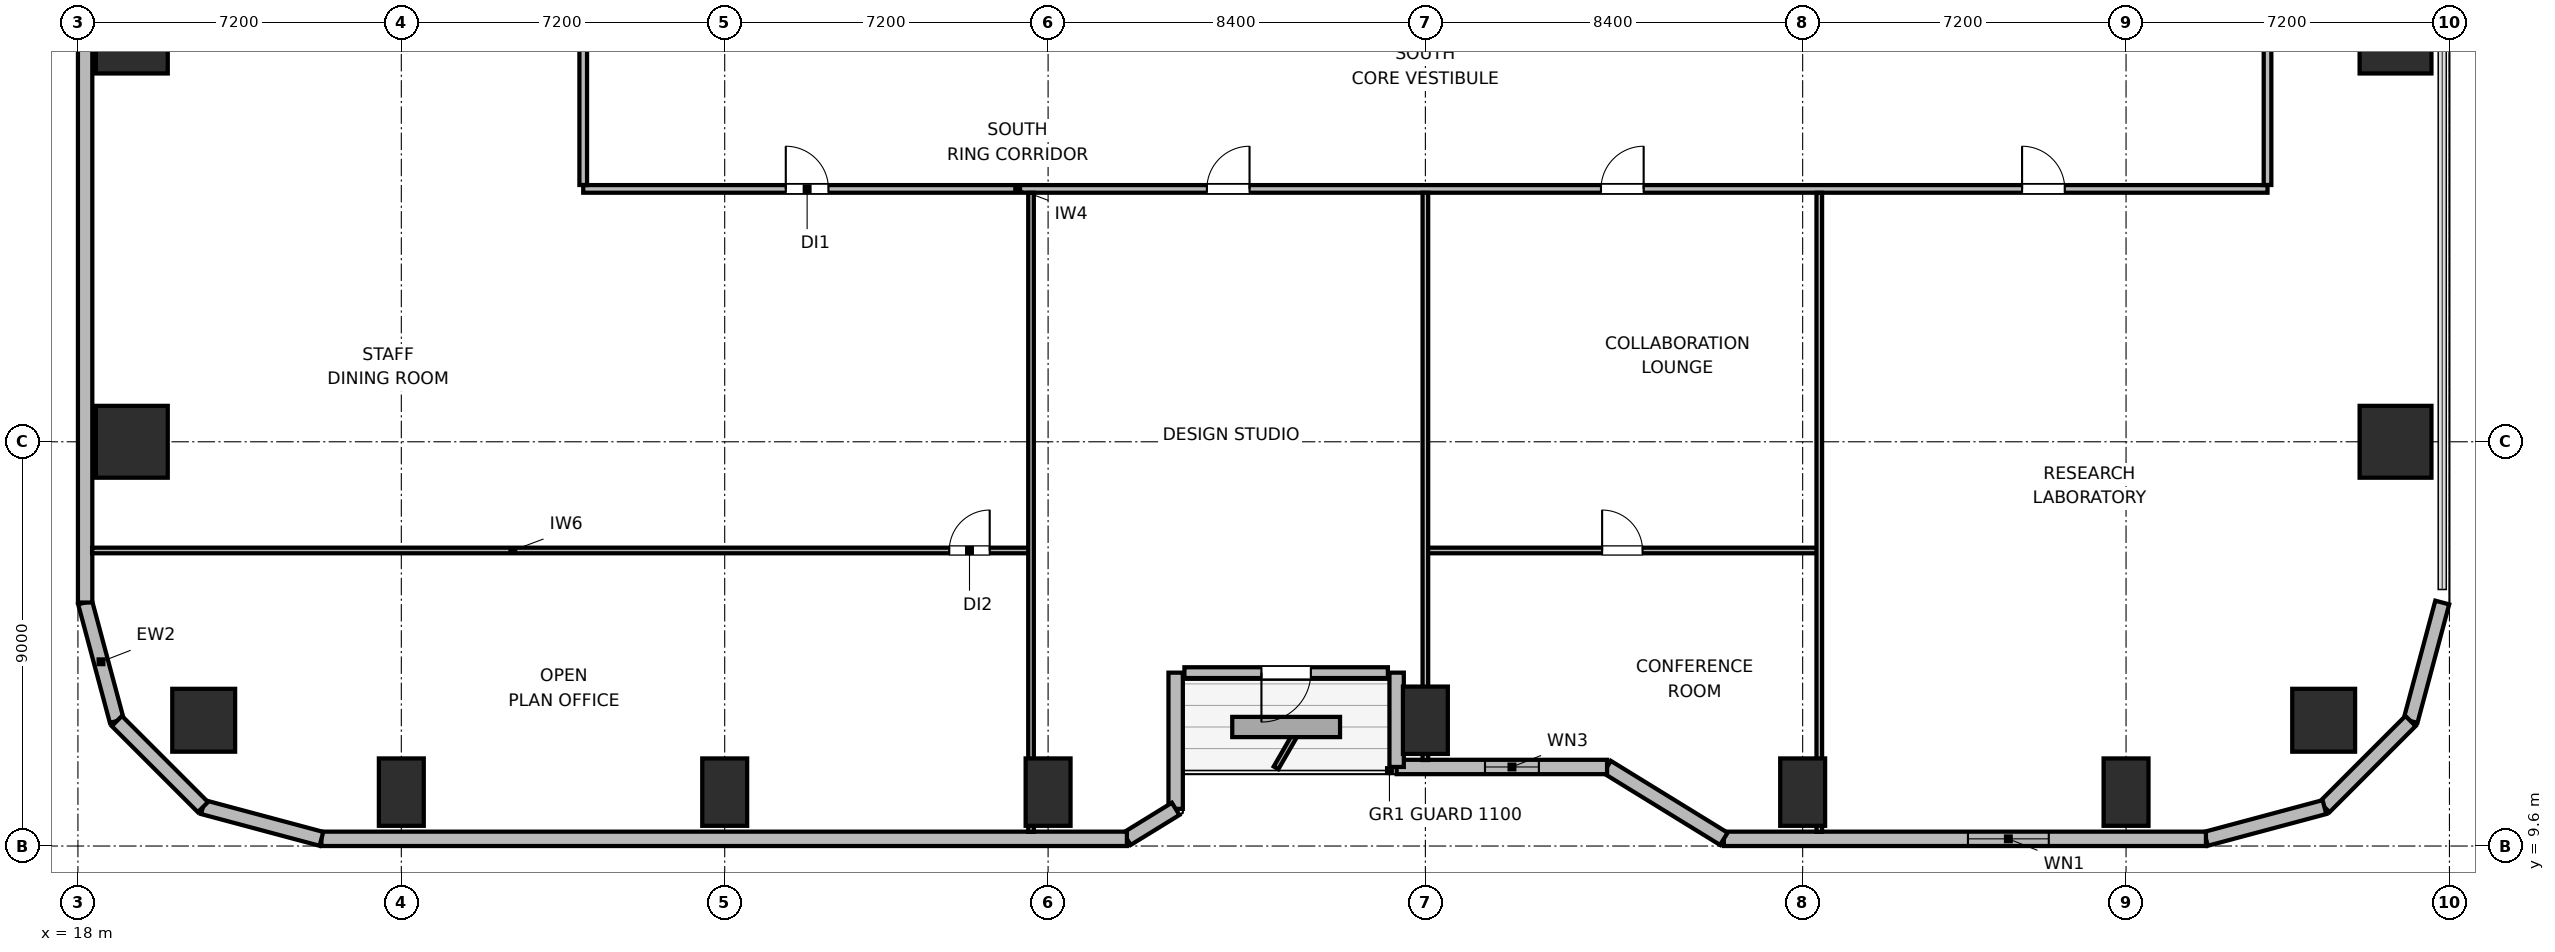
"""IFC4 building model, lengths in metres.
Left out: names, types, materials, properties, quantities, classifications, styles, units other than length and angle.
Written with IfcOpenShell. Run it as: python <this file> out.ifc"""

import sys

from ifc_helpers import new_model, si_unit, direction, frame, frame_2d, origin, origin_2d, place, context, subcontext, project, spatial, rectangle, circle, extrude, element, fill, save


model = new_model("IFC4")
c1 = context("Model", 3, precision=1e-05, world=origin(), true_north=direction((0.0, 1.0)))
c2 = subcontext(c1, "Body", "Model", "MODEL_VIEW")
j1 = project(units=[si_unit("LENGTHUNIT", "METRE"), si_unit("PLANEANGLEUNIT", "RADIAN")], contexts=[c1])
p1 = place(None, origin())
s1 = spatial("IfcSite", under=j1, at=p1, CompositionType="ELEMENT")
p2 = place(p1, origin())
s2 = spatial("IfcBuilding", under=s1, at=p2, CompositionType="ELEMENT")
p3 = place(p2, frame((0.0, 0.0, 89.7)))
s3 = spatial("IfcBuildingStorey", under=s2, at=p3, CompositionType="ELEMENT", Elevation=89.7)
for number, where, z_axis, x_axis in (
    (1, (20.8, 12.4, 0.0), (0.0, 0.0, 1.0), (1.0, 0.0, 0.0)),
    (2, (68.0, 12.4, 0.0), (0.0, 0.0, 1.0), (1.0, 0.0, 0.0)),
):
    element("IfcColumn", number, at=place(p3, frame(where, z_axis=z_axis, x_axis=x_axis)), inside=s3, PredefinedType="COLUMN", context=c2, shape_type="SweptSolid", body=[
        extrude(circle(Radius=0.7, at=origin_2d()), origin(), (0.0, 0.0, 1.0), 3.9),
    ])
for number, where, z_axis, x_axis in (
    (3, (25.2, 10.8, 0.0), (0.0, 0.0, 1.0), (1.0, 0.0, 0.0)),
    (4, (32.4, 10.8, 0.0), (0.0, 0.0, 1.0), (1.0, 0.0, 0.0)),
    (5, (39.6, 10.8, 0.0), (0.0, 0.0, 1.0), (1.0, 0.0, 0.0)),
    (6, (48.0, 12.4, 0.0), (0.0, 0.0, 1.0), (1.0, 0.0, 0.0)),
    (7, (56.4, 10.8, 0.0), (0.0, 0.0, 1.0), (1.0, 0.0, 0.0)),
    (8, (63.6, 10.8, 0.0), (0.0, 0.0, 1.0), (1.0, 0.0, 0.0)),
):
    element("IfcColumn", number, at=place(p3, frame(where, z_axis=z_axis, x_axis=x_axis)), inside=s3, PredefinedType="COLUMN", context=c2, shape_type="SweptSolid", body=[
        extrude(rectangle(XDim=1.0, YDim=1.5, at=origin_2d()), origin(), (0.0, 0.0, 1.0), 3.9),
    ])
for number, where, z_axis, x_axis in (
    (9, (19.2, 18.6, 0.0), (0.0, 0.0, 1.0), (1.0, 0.0, 0.0)),
    (10, (69.6, 18.6, 0.0), (0.0, 0.0, 1.0), (1.0, 0.0, 0.0)),
    (11, (19.2, 27.6, 0.0), (0.0, 0.0, 1.0), (1.0, 0.0, 0.0)),
    (12, (69.6, 27.6, 0.0), (0.0, 0.0, 1.0), (1.0, 0.0, 0.0)),
):
    element("IfcColumn", number, at=place(p3, frame(where, z_axis=z_axis, x_axis=x_axis)), inside=s3, PredefinedType="COLUMN", context=c2, shape_type="SweptSolid", body=[
        extrude(rectangle(XDim=1.6, YDim=1.6, at=origin_2d()), origin(), (0.0, 0.0, 1.0), 3.9),
    ])
p4 = place(p3, frame((18.866, 12.383, 0.0), z_axis=(0.0, 0.0, 1.0), x_axis=(-0.25869736047, 0.965958423373, 0.0)))
e13 = element("IfcWall", 13, at=p4, inside=s3, PredefinedType="SOLIDWALL", context=c2, shape_type="SweptSolid", body=[
    extrude(rectangle(XDim=2.731, YDim=0.32, at=frame_2d((1.366, 0.0))), origin(), (0.0, 0.0, 1.0), 3.64),
])
p5 = place(p3, frame((18.16, 15.021, 0.0), z_axis=(0.0, 0.0, 1.0), x_axis=(0.0, 1.0, 0.0)))
e14 = element("IfcWall", 14, at=p5, inside=s3, PredefinedType="SOLIDWALL", context=c2, shape_type="SweptSolid", body=[
    extrude(rectangle(XDim=14.219, YDim=0.32, at=frame_2d((7.109, 0.0))), origin(), (0.0, 0.0, 1.0), 3.64),
])
p6 = place(p3, frame((70.64, 15.021, 0.0), z_axis=(0.0, 0.0, 1.0), x_axis=(-0.258613949072, -0.965980758269, 0.0)))
e15 = element("IfcWall", 15, at=p6, inside=s3, PredefinedType="SOLIDWALL", context=c2, shape_type="SweptSolid", body=[
    extrude(rectangle(XDim=2.731, YDim=0.32, at=frame_2d((1.366, 0.0))), origin(), (0.0, 0.0, 1.0), 3.64),
])
p7 = place(p3, frame((69.934, 12.383, 0.0), z_axis=(0.0, 0.0, 1.0), x_axis=(-0.707151821269, -0.707061738235, 0.0)))
e16 = element("IfcWall", 16, at=p7, inside=s3, PredefinedType="SOLIDWALL", context=c2, shape_type="SweptSolid", body=[
    extrude(rectangle(XDim=2.71, YDim=0.32, at=frame_2d((1.355, 0.0))), origin(), (0.0, 0.0, 1.0), 3.64),
])
p8 = place(p3, frame((68.017, 10.467, 0.0), z_axis=(0.0, 0.0, 1.0), x_axis=(-0.965958423373, -0.25869736047, 0.0)))
e17 = element("IfcWall", 17, at=p8, inside=s3, PredefinedType="SOLIDWALL", context=c2, shape_type="SweptSolid", body=[
    extrude(rectangle(XDim=2.731, YDim=0.32, at=frame_2d((1.366, 0.0))), origin(), (0.0, 0.0, 1.0), 3.64),
])
p9 = place(p3, frame((65.379, 9.76, 0.0), z_axis=(0.0, 0.0, 1.0), x_axis=(-1.0, 0.0, 0.0)))
e18 = element("IfcWall", 18, at=p9, inside=s3, PredefinedType="SOLIDWALL", context=c2, shape_type="SweptSolid", body=[
    extrude(rectangle(XDim=10.734, YDim=0.32, at=frame_2d((5.367, 0.0))), origin(), (0.0, 0.0, 1.0), 3.64),
])
p10 = place(p9, frame((3.499, 0.0, 0.85)))
e19 = element("IfcOpeningElement", 19, at=p10, cuts=e18, PredefinedType="OPENING", context=c2, shape_type="SweptSolid", body=[
    extrude(rectangle(XDim=1.8, YDim=1.1, at=frame_2d((0.9, 0.55))), frame((0.0, 0.17, 0.0), z_axis=(0.0, -1.0, 0.0), x_axis=(1.0, 0.0, 0.0)), (0.0, 0.0, 1.0), 0.34),
])
p11 = place(p3, frame((54.645, 9.76, 0.0), z_axis=(0.0, 0.0, 1.0), x_axis=(-0.851630857047, 0.524142044989, 0.0)))
e20 = element("IfcWall", 20, at=p11, inside=s3, PredefinedType="SOLIDWALL", context=c2, shape_type="SweptSolid", body=[
    extrude(rectangle(XDim=3.053, YDim=0.32, at=frame_2d((1.526, 0.0))), origin(), (0.0, 0.0, 1.0), 2.875),
])
p12 = place(p3, frame((52.045, 11.36, 0.0), z_axis=(0.0, 0.0, 1.0), x_axis=(-1.0, 0.0, 0.0)))
e21 = element("IfcWall", 21, at=p12, inside=s3, PredefinedType="SOLIDWALL", context=c2, shape_type="SweptSolid", body=[
    extrude(rectangle(XDim=4.685, YDim=0.32, at=frame_2d((2.343, 0.0))), origin(), (0.0, 0.0, 1.0), 2.875),
])
p13 = place(p12, frame((1.518, 0.0, 0.85)))
e22 = element("IfcOpeningElement", 22, at=p13, cuts=e21, PredefinedType="OPENING", context=c2, shape_type="SweptSolid", body=[
    extrude(rectangle(XDim=1.2, YDim=1.1, at=frame_2d((0.6, 0.55))), frame((0.0, 0.17, 0.0), z_axis=(0.0, -1.0, 0.0), x_axis=(1.0, 0.0, 0.0)), (0.0, 0.0, 1.0), 0.34),
])
p14 = place(p3, frame((47.36, 11.36, 0.0), z_axis=(0.0, 0.0, 1.0), x_axis=(0.0, 1.0, 0.0)))
e23 = element("IfcWall", 23, at=p14, inside=s3, PredefinedType="SOLIDWALL", context=c2, shape_type="SweptSolid", body=[
    extrude(rectangle(XDim=2.1, YDim=0.32, at=frame_2d((1.05, 0.0))), origin(), (0.0, 0.0, 1.0), 2.875),
])
p15 = place(p3, frame((47.165, 13.46, 0.0), z_axis=(0.0, 0.0, 1.0), x_axis=(-1.0, 0.0, 0.0)))
e24 = element("IfcWall", 24, at=p15, inside=s3, PredefinedType="SOLIDWALL", context=c2, shape_type="SweptSolid", body=[
    extrude(rectangle(XDim=4.53, YDim=0.24, at=frame_2d((2.265, 0.0))), origin(), (0.0, 0.0, 1.0), 3.64),
])
p16 = place(p15, frame((1.715, 0.0, 0.0)))
e25 = element("IfcOpeningElement", 25, at=p16, cuts=e24, PredefinedType="OPENING", context=c2, shape_type="SweptSolid", body=[
    extrude(rectangle(XDim=1.1, YDim=2.04, at=frame_2d((0.55, 1.02))), frame((0.0, 0.13, 0.0), z_axis=(0.0, -1.0, 0.0), x_axis=(1.0, 0.0, 0.0)), (0.0, 0.0, 1.0), 0.26),
])
p17 = place(p3, frame((42.44, 13.46, 0.0), z_axis=(0.0, 0.0, 1.0), x_axis=(0.0, -1.0, 0.0)))
e26 = element("IfcWall", 26, at=p17, inside=s3, PredefinedType="SOLIDWALL", context=c2, shape_type="SweptSolid", body=[
    extrude(rectangle(XDim=3.032, YDim=0.32, at=frame_2d((1.516, 0.0))), origin(), (0.0, 0.0, 1.0), 2.875),
])
p18 = place(p3, frame((42.44, 10.427, 0.0), z_axis=(0.0, 0.0, 1.0), x_axis=(-0.851776724646, -0.523904964045, 0.0)))
e27 = element("IfcWall", 27, at=p18, inside=s3, PredefinedType="SOLIDWALL", context=c2, shape_type="SweptSolid", body=[
    extrude(rectangle(XDim=1.274, YDim=0.32, at=frame_2d((0.637, 0.0))), origin(), (0.0, 0.0, 1.0), 3.64),
])
p19 = place(p3, frame((41.355, 9.76, 0.0), z_axis=(0.0, 0.0, 1.0), x_axis=(-1.0, 0.0, 0.0)))
e28 = element("IfcWall", 28, at=p19, inside=s3, PredefinedType="SOLIDWALL", context=c2, shape_type="SweptSolid", body=[
    extrude(rectangle(XDim=17.934, YDim=0.32, at=frame_2d((8.967, 0.0))), origin(), (0.0, 0.0, 1.0), 3.64),
])
p20 = place(p3, frame((23.421, 9.76, 0.0), z_axis=(0.0, 0.0, 1.0), x_axis=(-0.965964405026, 0.25867502435, 0.0)))
e29 = element("IfcWall", 29, at=p20, inside=s3, PredefinedType="SOLIDWALL", context=c2, shape_type="SweptSolid", body=[
    extrude(rectangle(XDim=2.731, YDim=0.32, at=frame_2d((1.366, 0.0))), origin(), (0.0, 0.0, 1.0), 3.64),
])
p21 = place(p3, frame((20.783, 10.467, 0.0), z_axis=(0.0, 0.0, 1.0), x_axis=(-0.707106781187, 0.707106781187, 0.0)))
e30 = element("IfcWall", 30, at=p21, inside=s3, PredefinedType="SOLIDWALL", context=c2, shape_type="SweptSolid", body=[
    extrude(rectangle(XDim=2.71, YDim=0.32, at=frame_2d((1.355, 0.0))), origin(), (0.0, 0.0, 1.0), 3.64),
])
p22 = place(p3, frame((29.25, 24.23, 0.0), z_axis=(0.0, 0.0, 1.0), x_axis=(1.0, 0.0, 0.0)))
e31 = element("IfcWall", 31, at=p22, inside=s3, PredefinedType="PARTITIONING", context=c2, shape_type="SweptSolid", body=[
    extrude(rectangle(XDim=37.5, YDim=0.17, at=frame_2d((18.75, 0.0))), origin(), (0.0, 0.0, 1.0), 3.64),
])
p23 = place(p22, frame((4.51, 0.0, 0.0)))
e32 = element("IfcOpeningElement", 32, at=p23, cuts=e31, PredefinedType="OPENING", context=c2, shape_type="SweptSolid", body=[
    extrude(rectangle(XDim=0.95, YDim=2.04, at=frame_2d((0.475, 1.02))), frame((0.0, 0.095, 0.0), z_axis=(0.0, -1.0, 0.0), x_axis=(1.0, 0.0, 0.0)), (0.0, 0.0, 1.0), 0.19),
])
p24 = place(p22, frame((13.885, 0.0, 0.0)))
e33 = element("IfcOpeningElement", 33, at=p24, cuts=e31, PredefinedType="OPENING", context=c2, shape_type="SweptSolid", body=[
    extrude(rectangle(XDim=0.95, YDim=2.04, at=frame_2d((0.475, 1.02))), frame((0.0, 0.095, 0.0), z_axis=(0.0, -1.0, 0.0), x_axis=(1.0, 0.0, 0.0)), (0.0, 0.0, 1.0), 0.19),
])
p25 = place(p22, frame((22.66, 0.0, 0.0)))
e34 = element("IfcOpeningElement", 34, at=p25, cuts=e31, PredefinedType="OPENING", context=c2, shape_type="SweptSolid", body=[
    extrude(rectangle(XDim=0.95, YDim=2.04, at=frame_2d((0.475, 1.02))), frame((0.0, 0.095, 0.0), z_axis=(0.0, -1.0, 0.0), x_axis=(1.0, 0.0, 0.0)), (0.0, 0.0, 1.0), 0.19),
])
p26 = place(p22, frame((32.035, 0.0, 0.0)))
e35 = element("IfcOpeningElement", 35, at=p26, cuts=e31, PredefinedType="OPENING", context=c2, shape_type="SweptSolid", body=[
    extrude(rectangle(XDim=0.95, YDim=2.04, at=frame_2d((0.475, 1.02))), frame((0.0, 0.095, 0.0), z_axis=(0.0, -1.0, 0.0), x_axis=(1.0, 0.0, 0.0)), (0.0, 0.0, 1.0), 0.19),
])
p27 = place(p3, frame((29.25, 24.317, 0.0), z_axis=(0.0, 0.0, 1.0), x_axis=(0.0, 1.0, 0.0)))
e36 = element("IfcWall", 36, at=p27, inside=s3, PredefinedType="PARTITIONING", context=c2, shape_type="SweptSolid", body=[
    extrude(rectangle(XDim=23.366, YDim=0.17, at=frame_2d((11.683, 0.0))), origin(), (0.0, 0.0, 1.0), 3.64),
])
p28 = place(p27, frame((4.023, 0.0, 0.0)))
e37 = element("IfcOpeningElement", 37, at=p28, cuts=e36, PredefinedType="OPENING", context=c2, shape_type="SweptSolid", body=[
    extrude(rectangle(XDim=0.95, YDim=2.04, at=frame_2d((0.475, 1.02))), frame((0.0, 0.095, 0.0), z_axis=(0.0, -1.0, 0.0), x_axis=(1.0, 0.0, 0.0)), (0.0, 0.0, 1.0), 0.19),
])
p29 = place(p27, frame((11.808, 0.0, 0.0)))
e38 = element("IfcOpeningElement", 38, at=p29, cuts=e36, PredefinedType="OPENING", context=c2, shape_type="SweptSolid", body=[
    extrude(rectangle(XDim=0.95, YDim=2.04, at=frame_2d((0.475, 1.02))), frame((0.0, 0.095, 0.0), z_axis=(0.0, -1.0, 0.0), x_axis=(1.0, 0.0, 0.0)), (0.0, 0.0, 1.0), 0.19),
])
p30 = place(p27, frame((18.993, 0.0, 0.0)))
e39 = element("IfcOpeningElement", 39, at=p30, cuts=e36, PredefinedType="OPENING", context=c2, shape_type="SweptSolid", body=[
    extrude(rectangle(XDim=0.95, YDim=2.04, at=frame_2d((0.475, 1.02))), frame((0.0, 0.095, 0.0), z_axis=(0.0, -1.0, 0.0), x_axis=(1.0, 0.0, 0.0)), (0.0, 0.0, 1.0), 0.19),
])
p31 = place(p3, frame((66.75, 24.317, 0.0), z_axis=(0.0, 0.0, 1.0), x_axis=(0.0, 1.0, 0.0)))
e40 = element("IfcWall", 40, at=p31, inside=s3, PredefinedType="PARTITIONING", context=c2, shape_type="SweptSolid", body=[
    extrude(rectangle(XDim=23.366, YDim=0.17, at=frame_2d((11.683, 0.0))), origin(), (0.0, 0.0, 1.0), 3.64),
])
p32 = place(p31, frame((4.823, 0.0, 0.0)))
e41 = element("IfcOpeningElement", 41, at=p32, cuts=e40, PredefinedType="OPENING", context=c2, shape_type="SweptSolid", body=[
    extrude(rectangle(XDim=0.95, YDim=2.04, at=frame_2d((0.475, 1.02))), frame((0.0, 0.095, 0.0), z_axis=(0.0, -1.0, 0.0), x_axis=(1.0, 0.0, 0.0)), (0.0, 0.0, 1.0), 0.19),
])
p33 = place(p31, frame((16.593, 0.0, 0.0)))
e42 = element("IfcOpeningElement", 42, at=p33, cuts=e40, PredefinedType="OPENING", context=c2, shape_type="SweptSolid", body=[
    extrude(rectangle(XDim=0.95, YDim=2.04, at=frame_2d((0.475, 1.02))), frame((0.0, 0.095, 0.0), z_axis=(0.0, -1.0, 0.0), x_axis=(1.0, 0.0, 0.0)), (0.0, 0.0, 1.0), 0.19),
])
p34 = place(p3, frame((18.315, 16.18, 0.0), z_axis=(0.0, 0.0, 1.0), x_axis=(1.0, 0.0, 0.0)))
e43 = element("IfcWall", 43, at=p34, inside=s3, PredefinedType="PARTITIONING", context=c2, shape_type="SweptSolid", body=[
    extrude(rectangle(XDim=20.905, YDim=0.125, at=frame_2d((10.453, 0.0))), origin(), (0.0, 0.0, 1.0), 3.64),
])
p35 = place(p34, frame((19.085, 0.0, 0.0)))
e44 = element("IfcOpeningElement", 44, at=p35, cuts=e43, PredefinedType="OPENING", context=c2, shape_type="SweptSolid", body=[
    extrude(rectangle(XDim=0.9, YDim=2.02, at=frame_2d((0.45, 1.01))), frame((0.0, 0.073, 0.0), z_axis=(0.0, -1.0, 0.0), x_axis=(1.0, 0.0, 0.0)), (0.0, 0.0, 1.0), 0.145),
])
p36 = place(p3, frame((39.22, 9.915, 0.0), z_axis=(0.0, 0.0, 1.0), x_axis=(0.0, 1.0, 0.0)))
e45 = element("IfcWall", 45, at=p36, inside=s3, PredefinedType="PARTITIONING", context=c2, shape_type="SweptSolid", body=[
    extrude(rectangle(XDim=14.228, YDim=0.125, at=frame_2d((7.114, 0.0))), origin(), (0.0, 0.0, 1.0), 3.64),
])
p37 = place(p3, frame((48.0, 16.18, 0.0), z_axis=(0.0, 0.0, 1.0), x_axis=(1.0, 0.0, 0.0)))
e46 = element("IfcWall", 46, at=p37, inside=s3, PredefinedType="PARTITIONING", context=c2, shape_type="SweptSolid", body=[
    extrude(rectangle(XDim=8.77, YDim=0.125, at=frame_2d((4.385, 0.0))), origin(), (0.0, 0.0, 1.0), 3.64),
])
p38 = place(p37, frame((3.935, 0.0, 0.0)))
e47 = element("IfcOpeningElement", 47, at=p38, cuts=e46, PredefinedType="OPENING", context=c2, shape_type="SweptSolid", body=[
    extrude(rectangle(XDim=0.9, YDim=2.02, at=frame_2d((0.45, 1.01))), frame((0.0, 0.073, 0.0), z_axis=(0.0, -1.0, 0.0), x_axis=(1.0, 0.0, 0.0)), (0.0, 0.0, 1.0), 0.145),
])
p39 = place(p3, frame((48.0, 11.515, 0.0), z_axis=(0.0, 0.0, 1.0), x_axis=(0.0, 1.0, 0.0)))
e48 = element("IfcWall", 48, at=p39, inside=s3, PredefinedType="PARTITIONING", context=c2, shape_type="SweptSolid", body=[
    extrude(rectangle(XDim=12.628, YDim=0.125, at=frame_2d((6.314, 0.0))), origin(), (0.0, 0.0, 1.0), 3.003),
])
p40 = place(p3, frame((56.77, 9.915, 0.0), z_axis=(0.0, 0.0, 1.0), x_axis=(0.0, 1.0, 0.0)))
e49 = element("IfcWall", 49, at=p40, inside=s3, PredefinedType="PARTITIONING", context=c2, shape_type="SweptSolid", body=[
    extrude(rectangle(XDim=14.228, YDim=0.125, at=frame_2d((7.114, 0.0))), origin(), (0.0, 0.0, 1.0), 3.64),
])
p41 = place(p10, origin())
e50 = element("IfcWindow", 50, at=p41, inside=s3, PartitioningType="SINGLE_PANEL", PredefinedType="WINDOW", context=c2, shape_type="SweptSolid", body=[
    extrude(rectangle(XDim=1.8, YDim=1.1, at=frame_2d((0.9, 0.55))), frame((0.0, 0.03, 0.0), z_axis=(0.0, -1.0, 0.0), x_axis=(1.0, 0.0, 0.0)), (0.0, 0.0, 1.0), 0.06),
])
fill(e19, e50)
p42 = place(p13, origin())
e51 = element("IfcWindow", 51, at=p42, inside=s3, PartitioningType="SINGLE_PANEL", PredefinedType="WINDOW", context=c2, shape_type="SweptSolid", body=[
    extrude(rectangle(XDim=1.2, YDim=1.1, at=frame_2d((0.6, 0.55))), frame((0.0, 0.03, 0.0), z_axis=(0.0, -1.0, 0.0), x_axis=(1.0, 0.0, 0.0)), (0.0, 0.0, 1.0), 0.06),
])
fill(e22, e51)
p43 = place(p16, origin())
e52 = element("IfcDoor", 52, at=p43, inside=s3, OperationType="SINGLE_SWING_RIGHT", PredefinedType="DOOR", context=c2, shape_type="SweptSolid", body=[
    extrude(rectangle(XDim=1.1, YDim=2.04, at=frame_2d((0.55, 1.02))), frame((0.0, 0.025, 0.0), z_axis=(0.0, -1.0, 0.0), x_axis=(1.0, 0.0, 0.0)), (0.0, 0.0, 1.0), 0.05),
])
fill(e25, e52)
p44 = place(p35, origin())
e53 = element("IfcDoor", 53, at=p44, inside=s3, OperationType="SINGLE_SWING_RIGHT", PredefinedType="DOOR", context=c2, shape_type="SweptSolid", body=[
    extrude(rectangle(XDim=0.9, YDim=2.02, at=frame_2d((0.45, 1.01))), frame((0.0, 0.025, 0.0), z_axis=(0.0, -1.0, 0.0), x_axis=(1.0, 0.0, 0.0)), (0.0, 0.0, 1.0), 0.05),
])
fill(e44, e53)
p45 = place(p23, origin())
e54 = element("IfcDoor", 54, at=p45, inside=s3, OperationType="SINGLE_SWING_LEFT", PredefinedType="DOOR", context=c2, shape_type="SweptSolid", body=[
    extrude(rectangle(XDim=0.95, YDim=2.04, at=frame_2d((0.475, 1.02))), frame((0.0, 0.025, 0.0), z_axis=(0.0, -1.0, 0.0), x_axis=(1.0, 0.0, 0.0)), (0.0, 0.0, 1.0), 0.05),
])
fill(e32, e54)
p46 = place(p24, origin())
e55 = element("IfcDoor", 55, at=p46, inside=s3, OperationType="SINGLE_SWING_RIGHT", PredefinedType="DOOR", context=c2, shape_type="SweptSolid", body=[
    extrude(rectangle(XDim=0.95, YDim=2.04, at=frame_2d((0.475, 1.02))), frame((0.0, 0.025, 0.0), z_axis=(0.0, -1.0, 0.0), x_axis=(1.0, 0.0, 0.0)), (0.0, 0.0, 1.0), 0.05),
])
fill(e33, e55)
p47 = place(p38, origin())
e56 = element("IfcDoor", 56, at=p47, inside=s3, OperationType="SINGLE_SWING_LEFT", PredefinedType="DOOR", context=c2, shape_type="SweptSolid", body=[
    extrude(rectangle(XDim=0.9, YDim=2.02, at=frame_2d((0.45, 1.01))), frame((0.0, 0.025, 0.0), z_axis=(0.0, -1.0, 0.0), x_axis=(1.0, 0.0, 0.0)), (0.0, 0.0, 1.0), 0.05),
])
fill(e47, e56)
p48 = place(p25, origin())
e57 = element("IfcDoor", 57, at=p48, inside=s3, OperationType="SINGLE_SWING_RIGHT", PredefinedType="DOOR", context=c2, shape_type="SweptSolid", body=[
    extrude(rectangle(XDim=0.95, YDim=2.04, at=frame_2d((0.475, 1.02))), frame((0.0, 0.025, 0.0), z_axis=(0.0, -1.0, 0.0), x_axis=(1.0, 0.0, 0.0)), (0.0, 0.0, 1.0), 0.05),
])
fill(e34, e57)
p49 = place(p26, origin())
e58 = element("IfcDoor", 58, at=p49, inside=s3, OperationType="SINGLE_SWING_LEFT", PredefinedType="DOOR", context=c2, shape_type="SweptSolid", body=[
    extrude(rectangle(XDim=0.95, YDim=2.04, at=frame_2d((0.475, 1.02))), frame((0.0, 0.025, 0.0), z_axis=(0.0, -1.0, 0.0), x_axis=(1.0, 0.0, 0.0)), (0.0, 0.0, 1.0), 0.05),
])
fill(e35, e58)
save(model, sys.argv[1])
